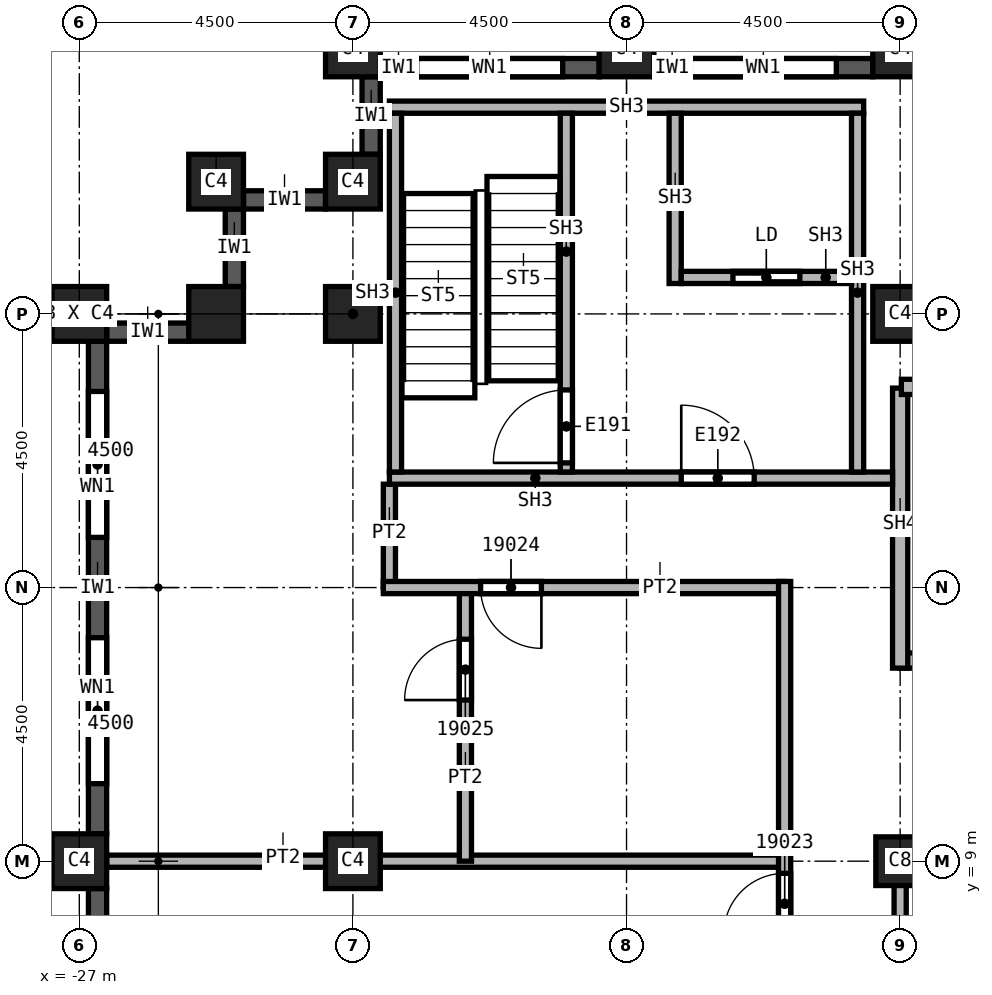
"""IFC4 building model, lengths in metres.
Left out: names, types, materials, properties, quantities, classifications, styles, units other than length and angle.
Written with IfcOpenShell. Run it as: python <this file> out.ifc"""

import sys

from ifc_helpers import new_model, si_unit, direction, frame, frame_2d, origin, origin_2d, place, context, subcontext, project, spatial, rectangle, extrude, element, fill, save


model = new_model("IFC4")
c1 = context("Model", 3, precision=1e-05, world=origin(), true_north=direction((0.0, 1.0)))
c2 = subcontext(c1, "Body", "Model", "MODEL_VIEW")
j1 = project(units=[si_unit("LENGTHUNIT", "METRE"), si_unit("PLANEANGLEUNIT", "RADIAN")], contexts=[c1])
p1 = place(None, origin())
s1 = spatial("IfcSite", under=j1, at=p1, CompositionType="ELEMENT")
p2 = place(p1, origin())
s2 = spatial("IfcBuilding", under=s1, at=p2, CompositionType="ELEMENT")
p3 = place(p2, frame((0.0, 0.0, 282.0)))
s3 = spatial("IfcBuildingStorey", under=s2, at=p3, CompositionType="ELEMENT", Elevation=282.0)
for number, where, z_axis, x_axis in (
    (1, (-13.5, 18.0, 0.0), (0.0, 0.0, 1.0), (1.0, 0.0, 0.0)),
    (2, (-22.5, 9.0, 0.0), (0.0, 0.0, 1.0), (1.0, 0.0, 0.0)),
    (3, (-22.5, 18.0, 0.0), (0.0, 0.0, 1.0), (1.0, 0.0, 0.0)),
):
    element("IfcColumn", number, at=place(p3, frame(where, z_axis=z_axis, x_axis=x_axis)), inside=s3, PredefinedType="COLUMN", context=c2, shape_type="SweptSolid", body=[
        extrude(rectangle(XDim=0.9, YDim=0.9, at=origin_2d()), origin(), (0.0, 0.0, 1.0), 3.72),
    ])
p4 = place(p3, frame((-13.5, 9.0, 0.0), z_axis=(0.0, 0.0, 1.0), x_axis=(1.0, 0.0, 0.0)))
e4 = element("IfcColumn", 4, at=p4, inside=s3, PredefinedType="COLUMN", context=c2, shape_type="SweptSolid", body=[
    extrude(rectangle(XDim=0.8, YDim=0.8, at=origin_2d()), origin(), (0.0, 0.0, 1.0), 3.72),
])
for number, where, z_axis, x_axis in (
    (5, (-13.5, 22.35, 0.0), (0.0, 0.0, 1.0), (1.0, 0.0, 0.0)),
    (6, (-18.0, 22.35, 0.0), (0.0, 0.0, 1.0), (1.0, 0.0, 0.0)),
    (7, (-22.5, 22.35, 0.0), (0.0, 0.0, 1.0), (1.0, 0.0, 0.0)),
    (8, (-27.0, 9.0, 0.0), (0.0, 0.0, 1.0), (0.0, 1.0, 0.0)),
    (9, (-27.0, 18.0, 0.0), (0.0, 0.0, 1.0), (0.0, 1.0, 0.0)),
    (10, (-22.5, 20.175, 0.0), (0.0, 0.0, 1.0), (1.0, 0.0, 0.0)),
    (11, (-24.75, 20.175, 0.0), (0.0, 0.0, 1.0), (1.0, 0.0, 0.0)),
    (12, (-24.75, 18.0, 0.0), (0.0, 0.0, 1.0), (1.0, 0.0, 0.0)),
):
    element("IfcColumn", number, at=place(p3, frame(where, z_axis=z_axis, x_axis=x_axis)), inside=s3, PredefinedType="COLUMN", context=c2, shape_type="SweptSolid", body=[
        extrude(rectangle(XDim=0.9, YDim=0.9, at=origin_2d()), origin(), (0.0, 0.0, 1.0), 3.72),
    ])
p5 = place(p3, frame((-24.45, 19.725, 0.0), z_axis=(0.0, 0.0, 1.0), x_axis=(0.0, -1.0, 0.0)))
e13 = element("IfcWall", 13, at=p5, inside=s3, PredefinedType="SOLIDWALL", context=c2, shape_type="SweptSolid", body=[
    extrude(rectangle(XDim=1.275, YDim=0.3, at=frame_2d((0.638, 0.0))), origin(), (0.0, 0.0, 1.0), 3.12),
])
p6 = place(p3, frame((-25.2, 17.7, 0.0), z_axis=(0.0, 0.0, 1.0), x_axis=(-1.0, 0.0, 0.0)))
e14 = element("IfcWall", 14, at=p6, inside=s3, PredefinedType="SOLIDWALL", context=c2, shape_type="SweptSolid", body=[
    extrude(rectangle(XDim=1.35, YDim=0.3, at=frame_2d((0.675, 0.0))), origin(), (0.0, 0.0, 1.0), 3.12),
])
p7 = place(p3, frame((-26.7, 17.55, 0.0), z_axis=(0.0, 0.0, 1.0), x_axis=(0.0, -1.0, 0.0)))
e15 = element("IfcWall", 15, at=p7, inside=s3, PredefinedType="SOLIDWALL", context=c2, shape_type="SweptSolid", body=[
    extrude(rectangle(XDim=8.1, YDim=0.3, at=frame_2d((4.05, 0.0))), origin(), (0.0, 0.0, 1.0), 3.12),
])
p8 = place(p7, frame((0.825, 0.0, 0.8)))
e16 = element("IfcOpeningElement", 16, at=p8, cuts=e15, PredefinedType="OPENING", context=c2, shape_type="SweptSolid", body=[
    extrude(rectangle(XDim=2.4, YDim=1.95, at=frame_2d((1.2, 0.975))), frame((0.0, 0.15, 0.0), z_axis=(0.0, -1.0, 0.0), x_axis=(1.0, 0.0, 0.0)), (0.0, 0.0, 1.0), 0.3),
])
p9 = place(p7, frame((4.875, 0.0, 0.8)))
e17 = element("IfcOpeningElement", 17, at=p9, cuts=e15, PredefinedType="OPENING", context=c2, shape_type="SweptSolid", body=[
    extrude(rectangle(XDim=2.4, YDim=1.95, at=frame_2d((1.2, 0.975))), frame((0.0, 0.15, 0.0), z_axis=(0.0, -1.0, 0.0), x_axis=(1.0, 0.0, 0.0)), (0.0, 0.0, 1.0), 0.3),
])
p10 = place(p3, frame((-26.7, 8.55, 0.0), z_axis=(0.0, 0.0, 1.0), x_axis=(0.0, -1.0, 0.0)))
e18 = element("IfcWall", 18, at=p10, inside=s3, PredefinedType="SOLIDWALL", context=c2, shape_type="SweptSolid", body=[
    extrude(rectangle(XDim=8.1, YDim=0.3, at=frame_2d((4.05, 0.0))), origin(), (0.0, 0.0, 1.0), 3.12),
])
p11 = place(p10, frame((0.825, 0.0, 0.8)))
e19 = element("IfcOpeningElement", 19, at=p11, cuts=e18, PredefinedType="OPENING", context=c2, shape_type="SweptSolid", body=[
    extrude(rectangle(XDim=2.4, YDim=1.95, at=frame_2d((1.2, 0.975))), frame((0.0, 0.15, 0.0), z_axis=(0.0, -1.0, 0.0), x_axis=(1.0, 0.0, 0.0)), (0.0, 0.0, 1.0), 0.3),
])
p12 = place(p10, frame((4.875, 0.0, 0.8)))
e20 = element("IfcOpeningElement", 20, at=p12, cuts=e18, PredefinedType="OPENING", context=c2, shape_type="SweptSolid", body=[
    extrude(rectangle(XDim=2.4, YDim=1.95, at=frame_2d((1.2, 0.975))), frame((0.0, 0.15, 0.0), z_axis=(0.0, -1.0, 0.0), x_axis=(1.0, 0.0, 0.0)), (0.0, 0.0, 1.0), 0.3),
])
p13 = place(p3, frame((-13.95, 22.05, 0.0), z_axis=(0.0, 0.0, 1.0), x_axis=(-1.0, 0.0, 0.0)))
e21 = element("IfcWall", 21, at=p13, inside=s3, PredefinedType="SOLIDWALL", context=c2, shape_type="SweptSolid", body=[
    extrude(rectangle(XDim=3.6, YDim=0.3, at=frame_2d((1.8, 0.0))), origin(), (0.0, 0.0, 1.0), 3.12),
])
p14 = place(p13, frame((0.6, 0.0, 0.8)))
e22 = element("IfcOpeningElement", 22, at=p14, cuts=e21, PredefinedType="OPENING", context=c2, shape_type="SweptSolid", body=[
    extrude(rectangle(XDim=2.4, YDim=1.95, at=frame_2d((1.2, 0.975))), frame((0.0, 0.15, 0.0), z_axis=(0.0, -1.0, 0.0), x_axis=(1.0, 0.0, 0.0)), (0.0, 0.0, 1.0), 0.3),
])
p15 = place(p3, frame((-18.45, 22.05, 0.0), z_axis=(0.0, 0.0, 1.0), x_axis=(-1.0, 0.0, 0.0)))
e23 = element("IfcWall", 23, at=p15, inside=s3, PredefinedType="SOLIDWALL", context=c2, shape_type="SweptSolid", body=[
    extrude(rectangle(XDim=3.6, YDim=0.3, at=frame_2d((1.8, 0.0))), origin(), (0.0, 0.0, 1.0), 3.12),
])
p16 = place(p15, frame((0.6, 0.0, 0.8)))
e24 = element("IfcOpeningElement", 24, at=p16, cuts=e23, PredefinedType="OPENING", context=c2, shape_type="SweptSolid", body=[
    extrude(rectangle(XDim=2.4, YDim=1.95, at=frame_2d((1.2, 0.975))), frame((0.0, 0.15, 0.0), z_axis=(0.0, -1.0, 0.0), x_axis=(1.0, 0.0, 0.0)), (0.0, 0.0, 1.0), 0.3),
])
p17 = place(p3, frame((-22.2, 21.9, 0.0), z_axis=(0.0, 0.0, 1.0), x_axis=(0.0, -1.0, 0.0)))
e25 = element("IfcWall", 25, at=p17, inside=s3, PredefinedType="SOLIDWALL", context=c2, shape_type="SweptSolid", body=[
    extrude(rectangle(XDim=1.275, YDim=0.3, at=frame_2d((0.637, 0.0))), origin(), (0.0, 0.0, 1.0), 3.12),
])
p18 = place(p3, frame((-22.95, 19.875, 0.0), z_axis=(0.0, 0.0, 1.0), x_axis=(-1.0, 0.0, 0.0)))
e26 = element("IfcWall", 26, at=p18, inside=s3, PredefinedType="SOLIDWALL", context=c2, shape_type="SweptSolid", body=[
    extrude(rectangle(XDim=1.35, YDim=0.3, at=frame_2d((0.675, 0.0))), origin(), (0.0, 0.0, 1.0), 3.12),
])
p19 = place(p3, frame((-26.55, 9.0, 0.0), z_axis=(0.0, 0.0, 1.0), x_axis=(1.0, 0.0, 0.0)))
e27 = element("IfcWall", 27, at=p19, inside=s3, PredefinedType="PARTITIONING", context=c2, shape_type="SweptSolid", body=[
    extrude(rectangle(XDim=11.15, YDim=0.2, at=frame_2d((5.575, 0.0))), origin(), (0.0, 0.0, 1.0), 3.72),
])
p20 = place(p3, frame((-21.9, 13.5, 0.0), z_axis=(0.0, 0.0, 1.0), x_axis=(0.0, 1.0, 0.0)))
e28 = element("IfcWall", 28, at=p20, inside=s3, PredefinedType="PARTITIONING", context=c2, shape_type="SweptSolid", body=[
    extrude(rectangle(XDim=1.7, YDim=0.2, at=frame_2d((0.85, 0.0))), origin(), (0.0, 0.0, 1.0), 3.72),
])
p21 = place(p3, frame((-20.65, 9.0, 0.0), z_axis=(0.0, 0.0, 1.0), x_axis=(0.0, 1.0, 0.0)))
e29 = element("IfcWall", 29, at=p21, inside=s3, PredefinedType="PARTITIONING", context=c2, shape_type="SweptSolid", body=[
    extrude(rectangle(XDim=4.5, YDim=0.2, at=frame_2d((2.25, 0.0))), origin(), (0.0, 0.0, 1.0), 3.72),
])
p22 = place(p21, frame((2.65, 0.0, 0.0)))
e30 = element("IfcOpeningElement", 30, at=p22, cuts=e29, PredefinedType="OPENING", context=c2, shape_type="SweptSolid", body=[
    extrude(rectangle(XDim=1.0, YDim=2.1, at=frame_2d((0.5, 1.05))), frame((0.0, 0.1, 0.0), z_axis=(0.0, -1.0, 0.0), x_axis=(1.0, 0.0, 0.0)), (0.0, 0.0, 1.0), 0.2),
])
p23 = place(p3, frame((-15.4, 13.5, 0.0), z_axis=(0.0, 0.0, 1.0), x_axis=(-1.0, 0.0, 0.0)))
e31 = element("IfcWall", 31, at=p23, inside=s3, PredefinedType="PARTITIONING", context=c2, shape_type="SweptSolid", body=[
    extrude(rectangle(XDim=6.6, YDim=0.2, at=frame_2d((3.3, 0.0))), origin(), (0.0, 0.0, 1.0), 3.72),
])
p24 = place(p23, frame((4.0, 0.0, 0.0)))
e32 = element("IfcOpeningElement", 32, at=p24, cuts=e31, PredefinedType="OPENING", context=c2, shape_type="SweptSolid", body=[
    extrude(rectangle(XDim=1.0, YDim=2.1, at=frame_2d((0.5, 1.05))), frame((0.0, 0.1, 0.0), z_axis=(0.0, -1.0, 0.0), x_axis=(1.0, 0.0, 0.0)), (0.0, 0.0, 1.0), 0.2),
])
p25 = place(p3, frame((-15.4, -21.9, 0.0), z_axis=(0.0, 0.0, 1.0), x_axis=(0.0, 1.0, 0.0)))
e33 = element("IfcWall", 33, at=p25, inside=s3, PredefinedType="PARTITIONING", context=c2, shape_type="SweptSolid", body=[
    extrude(rectangle(XDim=35.5, YDim=0.2, at=frame_2d((17.75, 0.0))), origin(), (0.0, 0.0, 1.0), 3.72),
])
p26 = place(p25, frame((22.05, 0.0, 0.0)))
e34 = element("IfcOpeningElement", 34, at=p26, cuts=e33, PredefinedType="OPENING", context=c2, shape_type="SweptSolid", body=[
    extrude(rectangle(XDim=1.0, YDim=2.1, at=frame_2d((0.5, 1.05))), frame((0.0, 0.1, 0.0), z_axis=(0.0, -1.0, 0.0), x_axis=(1.0, 0.0, 0.0)), (0.0, 0.0, 1.0), 0.2),
])
p27 = place(p25, frame((29.7, 0.0, 0.0)))
e35 = element("IfcOpeningElement", 35, at=p27, cuts=e33, PredefinedType="OPENING", context=c2, shape_type="SweptSolid", body=[
    extrude(rectangle(XDim=1.0, YDim=2.1, at=frame_2d((0.5, 1.05))), frame((0.0, 0.1, 0.0), z_axis=(0.0, -1.0, 0.0), x_axis=(1.0, 0.0, 0.0)), (0.0, 0.0, 1.0), 0.2),
])
p28 = place(p25, frame((1.0, 0.0, 0.0)))
e36 = element("IfcOpeningElement", 36, at=p28, cuts=e33, PredefinedType="OPENING", context=c2, shape_type="SweptSolid", body=[
    extrude(rectangle(XDim=1.0, YDim=2.1, at=frame_2d((0.5, 1.05))), frame((0.0, 0.1, 0.0), z_axis=(0.0, -1.0, 0.0), x_axis=(1.0, 0.0, 0.0)), (0.0, 0.0, 1.0), 0.2),
])
p29 = place(p25, frame((3.15, 0.0, 0.0)))
e37 = element("IfcOpeningElement", 37, at=p29, cuts=e33, PredefinedType="OPENING", context=c2, shape_type="SweptSolid", body=[
    extrude(rectangle(XDim=1.0, YDim=2.1, at=frame_2d((0.5, 1.05))), frame((0.0, 0.1, 0.0), z_axis=(0.0, -1.0, 0.0), x_axis=(1.0, 0.0, 0.0)), (0.0, 0.0, 1.0), 0.2),
])
p30 = place(p25, frame((8.4, 0.0, 0.0)))
e38 = element("IfcOpeningElement", 38, at=p30, cuts=e33, PredefinedType="OPENING", context=c2, shape_type="SweptSolid", body=[
    extrude(rectangle(XDim=1.0, YDim=2.1, at=frame_2d((0.5, 1.05))), frame((0.0, 0.1, 0.0), z_axis=(0.0, -1.0, 0.0), x_axis=(1.0, 0.0, 0.0)), (0.0, 0.0, 1.0), 0.2),
])
p31 = place(p25, frame((17.25, 0.0, 0.0)))
e39 = element("IfcOpeningElement", 39, at=p31, cuts=e33, PredefinedType="OPENING", context=c2, shape_type="SweptSolid", body=[
    extrude(rectangle(XDim=1.0, YDim=2.1, at=frame_2d((0.5, 1.05))), frame((0.0, 0.1, 0.0), z_axis=(0.0, -1.0, 0.0), x_axis=(1.0, 0.0, 0.0)), (0.0, 0.0, 1.0), 0.2),
])
p32 = place(p25, frame((20.625, 0.0, 0.0)))
e40 = element("IfcOpeningElement", 40, at=p32, cuts=e33, PredefinedType="OPENING", context=c2, shape_type="SweptSolid", body=[
    extrude(rectangle(XDim=1.0, YDim=2.1, at=frame_2d((0.5, 1.05))), frame((0.0, 0.1, 0.0), z_axis=(0.0, -1.0, 0.0), x_axis=(1.0, 0.0, 0.0)), (0.0, 0.0, 1.0), 0.2),
])
p33 = place(p3, frame((-13.5, 6.0, 0.0), z_axis=(0.0, 0.0, 1.0), x_axis=(0.0, 1.0, 0.0)))
e41 = element("IfcWall", 41, at=p33, inside=s3, PredefinedType="SOLIDWALL", context=c2, shape_type="SweptSolid", body=[
    extrude(rectangle(XDim=3.1, YDim=0.2, at=frame_2d((1.55, 0.0))), origin(), (0.0, 0.0, 1.0), 3.042),
])
p34 = place(p3, frame((-13.5, 9.0, 0.0), z_axis=(0.0, 0.0, 1.0), x_axis=(1.0, 0.0, 0.0)))
e42 = element("IfcWall", 42, at=p34, inside=s3, PredefinedType="SOLIDWALL", context=c2, shape_type="SweptSolid", body=[
    extrude(rectangle(XDim=3.0, YDim=0.2, at=frame_2d((1.5, 0.0))), origin(), (0.0, 0.0, 1.0), 3.042),
])
p35 = place(p3, frame((-13.5, 12.3, 0.0), z_axis=(0.0, 0.0, 1.0), x_axis=(1.0, 0.0, 0.0)))
e43 = element("IfcWall", 43, at=p35, inside=s3, PredefinedType="SOLIDWALL", context=c2, shape_type="SweptSolid", body=[
    extrude(rectangle(XDim=9.125, YDim=0.25, at=frame_2d((4.562, 0.0))), origin(), (0.0, 0.0, 1.0), 3.72),
])
p36 = place(p35, frame((0.6, 0.0, 0.0)))
e44 = element("IfcOpeningElement", 44, at=p36, cuts=e43, PredefinedType="OPENING", context=c2, shape_type="SweptSolid", body=[
    extrude(rectangle(XDim=1.2, YDim=2.1, at=frame_2d((0.6, 1.05))), frame((0.0, 0.125, 0.0), z_axis=(0.0, -1.0, 0.0), x_axis=(1.0, 0.0, 0.0)), (0.0, 0.0, 1.0), 0.25),
])
p37 = place(p3, frame((-13.5, 16.78, 0.0), z_axis=(0.0, 0.0, 1.0), x_axis=(0.0, -1.0, 0.0)))
e45 = element("IfcWall", 45, at=p37, inside=s3, PredefinedType="SOLIDWALL", context=c2, shape_type="SweptSolid", body=[
    extrude(rectangle(XDim=4.605, YDim=0.25, at=frame_2d((2.302, 0.0))), origin(), (0.0, 0.0, 1.0), 3.72),
])
p38 = place(p3, frame((-13.48, 16.8, 0.0), z_axis=(0.0, 0.0, 1.0), x_axis=(1.0, 0.0, 0.0)))
e46 = element("IfcWall", 46, at=p38, inside=s3, PredefinedType="SOLIDWALL", context=c2, shape_type="SweptSolid", body=[
    extrude(rectangle(XDim=8.96, YDim=0.25, at=frame_2d((4.48, 0.0))), origin(), (0.0, 0.0, 1.0), 3.72),
])
p39 = place(p3, frame((-21.9, 15.3, 0.0), z_axis=(0.0, 0.0, 1.0), x_axis=(1.0, 0.0, 0.0)))
e47 = element("IfcWall", 47, at=p39, inside=s3, PredefinedType="SOLIDWALL", context=c2, shape_type="SweptSolid", body=[
    extrude(rectangle(XDim=8.275, YDim=0.2, at=frame_2d((4.137, 0.0))), origin(), (0.0, 0.0, 1.0), 3.72),
])
p40 = place(p39, frame((4.8, 0.0, 0.0)))
e48 = element("IfcOpeningElement", 48, at=p40, cuts=e47, PredefinedType="OPENING", context=c2, shape_type="SweptSolid", body=[
    extrude(rectangle(XDim=1.2, YDim=2.1, at=frame_2d((0.6, 1.05))), frame((0.0, 0.1, 0.0), z_axis=(0.0, -1.0, 0.0), x_axis=(1.0, 0.0, 0.0)), (0.0, 0.0, 1.0), 0.2),
])
p41 = place(p3, frame((-21.9, 21.4, 0.0), z_axis=(0.0, 0.0, 1.0), x_axis=(1.0, 0.0, 0.0)))
e49 = element("IfcWall", 49, at=p41, inside=s3, PredefinedType="SOLIDWALL", context=c2, shape_type="SweptSolid", body=[
    extrude(rectangle(XDim=7.8, YDim=0.2, at=frame_2d((3.9, 0.0))), origin(), (0.0, 0.0, 1.0), 3.72),
])
for number, where, z_axis, x_axis in (
    (50, (-21.8, 15.4, 0.0), (0.0, 0.0, 1.0), (0.0, 1.0, 0.0)),
    (51, (-14.2, 15.4, 0.0), (0.0, 0.0, 1.0), (0.0, 1.0, 0.0)),
):
    element("IfcWall", number, at=place(p3, frame(where, z_axis=z_axis, x_axis=x_axis)), inside=s3, PredefinedType="SOLIDWALL", context=c2, shape_type="SweptSolid", body=[
        extrude(rectangle(XDim=5.9, YDim=0.2, at=frame_2d((2.95, 0.0))), origin(), (0.0, 0.0, 1.0), 3.72),
    ])
p42 = place(p3, frame((-18.99, 15.4, 0.0), z_axis=(0.0, 0.0, 1.0), x_axis=(0.0, 1.0, 0.0)))
e52 = element("IfcWall", 52, at=p42, inside=s3, PredefinedType="SOLIDWALL", context=c2, shape_type="SweptSolid", body=[
    extrude(rectangle(XDim=5.9, YDim=0.2, at=frame_2d((2.95, 0.0))), origin(), (0.0, 0.0, 1.0), 3.72),
])
p43 = place(p42, frame((0.15, 0.0, 0.0)))
e53 = element("IfcOpeningElement", 53, at=p43, cuts=e52, PredefinedType="OPENING", context=c2, shape_type="SweptSolid", body=[
    extrude(rectangle(XDim=1.2, YDim=2.1, at=frame_2d((0.6, 1.05))), frame((0.0, 0.1, 0.0), z_axis=(0.0, -1.0, 0.0), x_axis=(1.0, 0.0, 0.0)), (0.0, 0.0, 1.0), 0.2),
])
p44 = place(p3, frame((-17.2, 18.5, 0.0), z_axis=(0.0, 0.0, 1.0), x_axis=(0.0, 1.0, 0.0)))
e54 = element("IfcWall", 54, at=p44, inside=s3, PredefinedType="SOLIDWALL", context=c2, shape_type="SweptSolid", body=[
    extrude(rectangle(XDim=2.8, YDim=0.2, at=frame_2d((1.4, 0.0))), origin(), (0.0, 0.0, 1.0), 3.72),
])
p45 = place(p3, frame((-17.1, 18.6, 0.0), z_axis=(0.0, 0.0, 1.0), x_axis=(1.0, 0.0, 0.0)))
e55 = element("IfcWall", 55, at=p45, inside=s3, PredefinedType="SOLIDWALL", context=c2, shape_type="SweptSolid", body=[
    extrude(rectangle(XDim=2.8, YDim=0.2, at=frame_2d((1.4, 0.0))), origin(), (0.0, 0.0, 1.0), 3.72),
])
p46 = place(p45, frame((0.85, 0.0, 0.0)))
e56 = element("IfcOpeningElement", 56, at=p46, cuts=e55, PredefinedType="OPENING", context=c2, shape_type="SweptSolid", body=[
    extrude(rectangle(XDim=1.1, YDim=2.1, at=frame_2d((0.55, 1.05))), frame((0.0, 0.1, 0.0), z_axis=(0.0, -1.0, 0.0), x_axis=(1.0, 0.0, 0.0)), (0.0, 0.0, 1.0), 0.2),
])
p47 = place(p8, origin())
e57 = element("IfcWindow", 57, at=p47, inside=s3, PartitioningType="SINGLE_PANEL", PredefinedType="WINDOW", context=c2, shape_type="SweptSolid", body=[
    extrude(rectangle(XDim=2.4, YDim=1.95, at=frame_2d((1.2, 0.975))), frame((0.0, 0.03, 0.0), z_axis=(0.0, -1.0, 0.0), x_axis=(1.0, 0.0, 0.0)), (0.0, 0.0, 1.0), 0.06),
])
fill(e16, e57)
p48 = place(p9, origin())
e58 = element("IfcWindow", 58, at=p48, inside=s3, PartitioningType="SINGLE_PANEL", PredefinedType="WINDOW", context=c2, shape_type="SweptSolid", body=[
    extrude(rectangle(XDim=2.4, YDim=1.95, at=frame_2d((1.2, 0.975))), frame((0.0, 0.03, 0.0), z_axis=(0.0, -1.0, 0.0), x_axis=(1.0, 0.0, 0.0)), (0.0, 0.0, 1.0), 0.06),
])
fill(e17, e58)
p49 = place(p14, origin())
e59 = element("IfcWindow", 59, at=p49, inside=s3, PartitioningType="SINGLE_PANEL", PredefinedType="WINDOW", context=c2, shape_type="SweptSolid", body=[
    extrude(rectangle(XDim=2.4, YDim=1.95, at=frame_2d((1.2, 0.975))), frame((0.0, 0.03, 0.0), z_axis=(0.0, -1.0, 0.0), x_axis=(1.0, 0.0, 0.0)), (0.0, 0.0, 1.0), 0.06),
])
fill(e22, e59)
p50 = place(p16, origin())
e60 = element("IfcWindow", 60, at=p50, inside=s3, PartitioningType="SINGLE_PANEL", PredefinedType="WINDOW", context=c2, shape_type="SweptSolid", body=[
    extrude(rectangle(XDim=2.4, YDim=1.95, at=frame_2d((1.2, 0.975))), frame((0.0, 0.03, 0.0), z_axis=(0.0, -1.0, 0.0), x_axis=(1.0, 0.0, 0.0)), (0.0, 0.0, 1.0), 0.06),
])
fill(e24, e60)
p51 = place(p27, origin())
e61 = element("IfcDoor", 61, at=p51, inside=s3, OperationType="SINGLE_SWING_RIGHT", PredefinedType="DOOR", context=c2, shape_type="SweptSolid", body=[
    extrude(rectangle(XDim=1.0, YDim=2.1, at=frame_2d((0.5, 1.05))), frame((0.0, 0.025, 0.0), z_axis=(0.0, -1.0, 0.0), x_axis=(1.0, 0.0, 0.0)), (0.0, 0.0, 1.0), 0.05),
])
fill(e35, e61)
p52 = place(p24, origin())
e62 = element("IfcDoor", 62, at=p52, inside=s3, OperationType="SINGLE_SWING_LEFT", PredefinedType="DOOR", context=c2, shape_type="SweptSolid", body=[
    extrude(rectangle(XDim=1.0, YDim=2.1, at=frame_2d((0.5, 1.05))), frame((0.0, 0.025, 0.0), z_axis=(0.0, -1.0, 0.0), x_axis=(1.0, 0.0, 0.0)), (0.0, 0.0, 1.0), 0.05),
])
fill(e32, e62)
p53 = place(p22, origin())
e63 = element("IfcDoor", 63, at=p53, inside=s3, OperationType="SINGLE_SWING_RIGHT", PredefinedType="DOOR", context=c2, shape_type="SweptSolid", body=[
    extrude(rectangle(XDim=1.0, YDim=2.1, at=frame_2d((0.5, 1.05))), frame((0.0, 0.025, 0.0), z_axis=(0.0, -1.0, 0.0), x_axis=(1.0, 0.0, 0.0)), (0.0, 0.0, 1.0), 0.05),
])
fill(e30, e63)
p54 = place(p43, origin())
e64 = element("IfcDoor", 64, at=p54, inside=s3, OperationType="SINGLE_SWING_LEFT", PredefinedType="DOOR", context=c2, shape_type="SweptSolid", body=[
    extrude(rectangle(XDim=1.2, YDim=2.1, at=frame_2d((0.6, 1.05))), frame((0.0, 0.025, 0.0), z_axis=(0.0, -1.0, 0.0), x_axis=(1.0, 0.0, 0.0)), (0.0, 0.0, 1.0), 0.05),
])
fill(e53, e64)
p55 = place(p46, origin())
e65 = element("IfcDoor", 65, at=p55, inside=s3, OperationType="SLIDING_TO_LEFT", PredefinedType="DOOR", context=c2, shape_type="SweptSolid", body=[
    extrude(rectangle(XDim=1.1, YDim=2.1, at=frame_2d((0.55, 1.05))), frame((0.0, 0.025, 0.0), z_axis=(0.0, -1.0, 0.0), x_axis=(1.0, 0.0, 0.0)), (0.0, 0.0, 1.0), 0.05),
])
fill(e56, e65)
p56 = place(p40, origin())
e66 = element("IfcDoor", 66, at=p56, inside=s3, OperationType="SINGLE_SWING_RIGHT", PredefinedType="DOOR", context=c2, shape_type="SweptSolid", body=[
    extrude(rectangle(XDim=1.2, YDim=2.1, at=frame_2d((0.6, 1.05))), frame((0.0, 0.025, 0.0), z_axis=(0.0, -1.0, 0.0), x_axis=(1.0, 0.0, 0.0)), (0.0, 0.0, 1.0), 0.05),
])
fill(e48, e66)
save(model, sys.argv[1])
